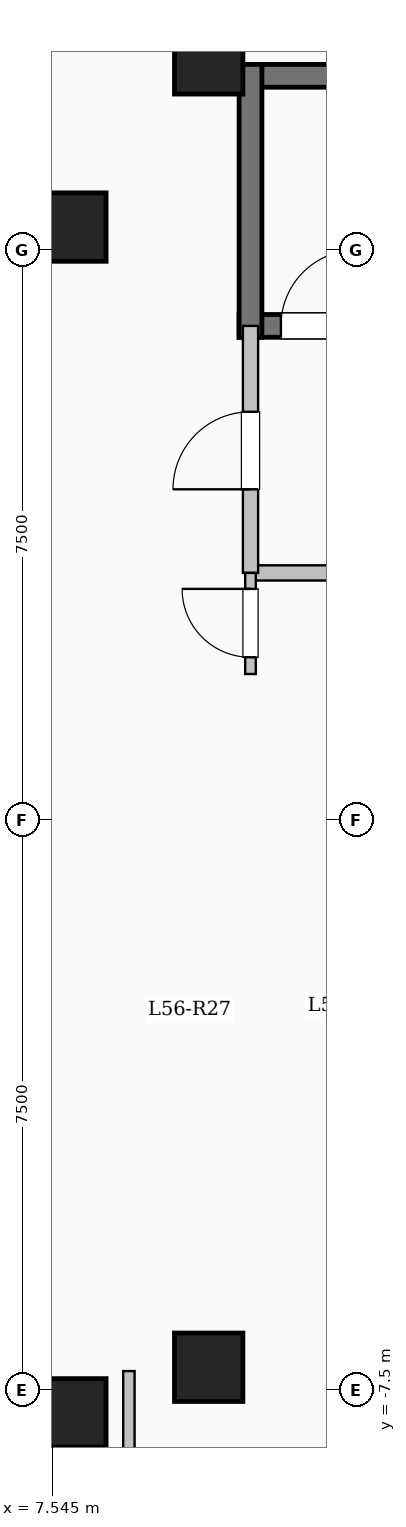
"""IFC4 building model, lengths in metres.
Left out: names, types, materials, properties, quantities, classifications, styles, units other than length and angle.
Written with IfcOpenShell. Run it as: python <this file> out.ifc"""

import sys

from ifc_helpers import new_model, si_unit, direction, frame, frame_2d, origin, origin_2d, place, context, subcontext, project, spatial, rectangle, extrude, element, fill, save


model = new_model("IFC4")
c1 = context("Model", 3, precision=1e-05, world=origin(), true_north=direction((0.0, 1.0)))
c2 = subcontext(c1, "Body", "Model", "MODEL_VIEW")
j1 = project(units=[si_unit("LENGTHUNIT", "METRE"), si_unit("PLANEANGLEUNIT", "RADIAN")], contexts=[c1])
p1 = place(None, origin())
s1 = spatial("IfcSite", under=j1, at=p1, CompositionType="ELEMENT")
p2 = place(p1, origin())
s2 = spatial("IfcBuilding", under=s1, at=p2, CompositionType="ELEMENT")
p3 = place(p2, frame((0.0, 0.0, 207.0)))
s3 = spatial("IfcBuildingStorey", under=s2, at=p3, CompositionType="ELEMENT", Elevation=207.0)
for number, where, z_axis, x_axis in (
    (1, (7.8, -7.8, 0.0), (0.0, 0.0, 1.0), (1.0, 0.0, 0.0)),
    (2, (7.8, 7.8, 0.0), (0.0, 0.0, 1.0), (1.0, 0.0, 0.0)),
    (3, (9.6, -7.2, 0.0), (0.0, 0.0, 1.0), (1.0, 0.0, 0.0)),
    (4, (9.6, 10.0, 0.0), (0.0, 0.0, 1.0), (1.0, 0.0, 0.0)),
):
    element("IfcColumn", number, at=place(p3, frame(where, z_axis=z_axis, x_axis=x_axis)), inside=s3, PredefinedType="COLUMN", context=c2, shape_type="SweptSolid", body=[
        extrude(rectangle(XDim=0.9, YDim=0.9, at=origin_2d()), origin(), (0.0, 0.0, 1.0), 3.35),
    ])
p4 = place(p3, frame((10.0, 9.79, 0.0), z_axis=(0.0, 0.0, 1.0), x_axis=(1.0, 0.0, 0.0)))
e5 = element("IfcWall", 5, at=p4, inside=s3, PredefinedType="SHEAR", context=c2, shape_type="SweptSolid", body=[
    extrude(rectangle(XDim=8.0, YDim=0.3, at=frame_2d((4.0, 0.0))), origin(), (0.0, 0.0, 1.0), 3.35),
])
p5 = place(p3, frame((10.0, 6.5, 0.0), z_axis=(0.0, 0.0, 1.0), x_axis=(1.0, 0.0, 0.0)))
e6 = element("IfcWall", 6, at=p5, inside=s3, PredefinedType="SHEAR", context=c2, shape_type="SweptSolid", body=[
    extrude(rectangle(XDim=8.0, YDim=0.3, at=frame_2d((4.0, 0.0))), origin(), (0.0, 0.0, 1.0), 3.35),
])
p6 = place(p5, frame((0.55, 0.0, 0.0)))
e7 = element("IfcOpeningElement", 7, at=p6, cuts=e6, PredefinedType="OPENING", context=c2, shape_type="SweptSolid", body=[
    extrude(rectangle(XDim=1.0, YDim=2.15, at=frame_2d((0.5, 1.075))), frame((0.0, 0.16, 0.0), z_axis=(0.0, -1.0, 0.0), x_axis=(1.0, 0.0, 0.0)), (0.0, 0.0, 1.0), 0.32),
])
p7 = place(p3, frame((10.15, 6.35, 0.0), z_axis=(0.0, 0.0, 1.0), x_axis=(0.0, 1.0, 0.0)))
e8 = element("IfcWall", 8, at=p7, inside=s3, PredefinedType="SHEAR", context=c2, shape_type="SweptSolid", body=[
    extrude(rectangle(XDim=3.59, YDim=0.3, at=frame_2d((1.795, 0.0))), origin(), (0.0, 0.0, 1.0), 3.35),
])
p8 = place(p3, frame((10.15, 3.25, 0.0), z_axis=(0.0, 0.0, 1.0), x_axis=(1.0, 0.0, 0.0)))
e9 = element("IfcWall", 9, at=p8, inside=s3, PredefinedType="SOLIDWALL", context=c2, shape_type="SweptSolid", body=[
    extrude(rectangle(XDim=5.4, YDim=0.2, at=frame_2d((2.7, 0.0))), origin(), (0.0, 0.0, 1.0), 3.1),
])
p9 = place(p3, frame((10.15, 3.25, 0.0), z_axis=(0.0, 0.0, 1.0), x_axis=(0.0, 1.0, 0.0)))
e10 = element("IfcWall", 10, at=p9, inside=s3, PredefinedType="SOLIDWALL", context=c2, shape_type="SweptSolid", body=[
    extrude(rectangle(XDim=3.25, YDim=0.2, at=frame_2d((1.625, 0.0))), origin(), (0.0, 0.0, 1.0), 3.1),
])
p10 = place(p9, frame((1.1, 0.0, 0.0)))
e11 = element("IfcOpeningElement", 11, at=p10, cuts=e10, PredefinedType="OPENING", context=c2, shape_type="SweptSolid", body=[
    extrude(rectangle(XDim=1.02, YDim=2.15, at=frame_2d((0.51, 1.075))), frame((0.0, 0.11, 0.0), z_axis=(0.0, -1.0, 0.0), x_axis=(1.0, 0.0, 0.0)), (0.0, 0.0, 1.0), 0.22),
])
p11 = place(p3, frame((10.15, 1.92, 0.0), z_axis=(0.0, 0.0, 1.0), x_axis=(0.0, 1.0, 0.0)))
e12 = element("IfcWall", 12, at=p11, inside=s3, PredefinedType="PARTITIONING", context=c2, shape_type="SweptSolid", body=[
    extrude(rectangle(XDim=1.33, YDim=0.14, at=frame_2d((0.665, 0.0))), origin(), (0.0, 0.0, 1.0), 3.1),
])
p12 = place(p11, frame((0.22, 0.0, 0.0)))
e13 = element("IfcOpeningElement", 13, at=p12, cuts=e12, PredefinedType="OPENING", context=c2, shape_type="SweptSolid", body=[
    extrude(rectangle(XDim=0.9, YDim=2.08, at=frame_2d((0.45, 1.04))), frame((0.0, 0.08, 0.0), z_axis=(0.0, -1.0, 0.0), x_axis=(1.0, 0.0, 0.0)), (0.0, 0.0, 1.0), 0.16),
])
p13 = place(p3, frame((8.55, -9.4, 0.0), z_axis=(0.0, 0.0, 1.0), x_axis=(0.0, 1.0, 0.0)))
e14 = element("IfcWall", 14, at=p13, inside=s3, PredefinedType="PARTITIONING", context=c2, shape_type="SweptSolid", body=[
    extrude(rectangle(XDim=2.15, YDim=0.15, at=frame_2d((1.075, 0.0))), origin(), (0.0, 0.0, 1.0), 3.1),
])
p14 = place(p6, origin())
e15 = element("IfcDoor", 15, at=p14, inside=s3, OperationType="SINGLE_SWING_RIGHT", PredefinedType="DOOR", context=c2, shape_type="SweptSolid", body=[
    extrude(rectangle(XDim=1.0, YDim=2.15, at=frame_2d((0.5, 1.075))), frame((0.0, 0.025, 0.0), z_axis=(0.0, -1.0, 0.0), x_axis=(1.0, 0.0, 0.0)), (0.0, 0.0, 1.0), 0.05),
])
fill(e7, e15)
p15 = place(p10, origin())
e16 = element("IfcDoor", 16, at=p15, inside=s3, OperationType="SINGLE_SWING_LEFT", PredefinedType="DOOR", context=c2, shape_type="SweptSolid", body=[
    extrude(rectangle(XDim=1.02, YDim=2.15, at=frame_2d((0.51, 1.075))), frame((0.0, 0.025, 0.0), z_axis=(0.0, -1.0, 0.0), x_axis=(1.0, 0.0, 0.0)), (0.0, 0.0, 1.0), 0.05),
])
fill(e11, e16)
p16 = place(p12, origin())
e17 = element("IfcDoor", 17, at=p16, inside=s3, OperationType="SINGLE_SWING_RIGHT", PredefinedType="DOOR", context=c2, shape_type="SweptSolid", body=[
    extrude(rectangle(XDim=0.9, YDim=2.08, at=frame_2d((0.45, 1.04))), frame((0.0, 0.025, 0.0), z_axis=(0.0, -1.0, 0.0), x_axis=(1.0, 0.0, 0.0)), (0.0, 0.0, 1.0), 0.05),
])
fill(e13, e17)
save(model, sys.argv[1])
